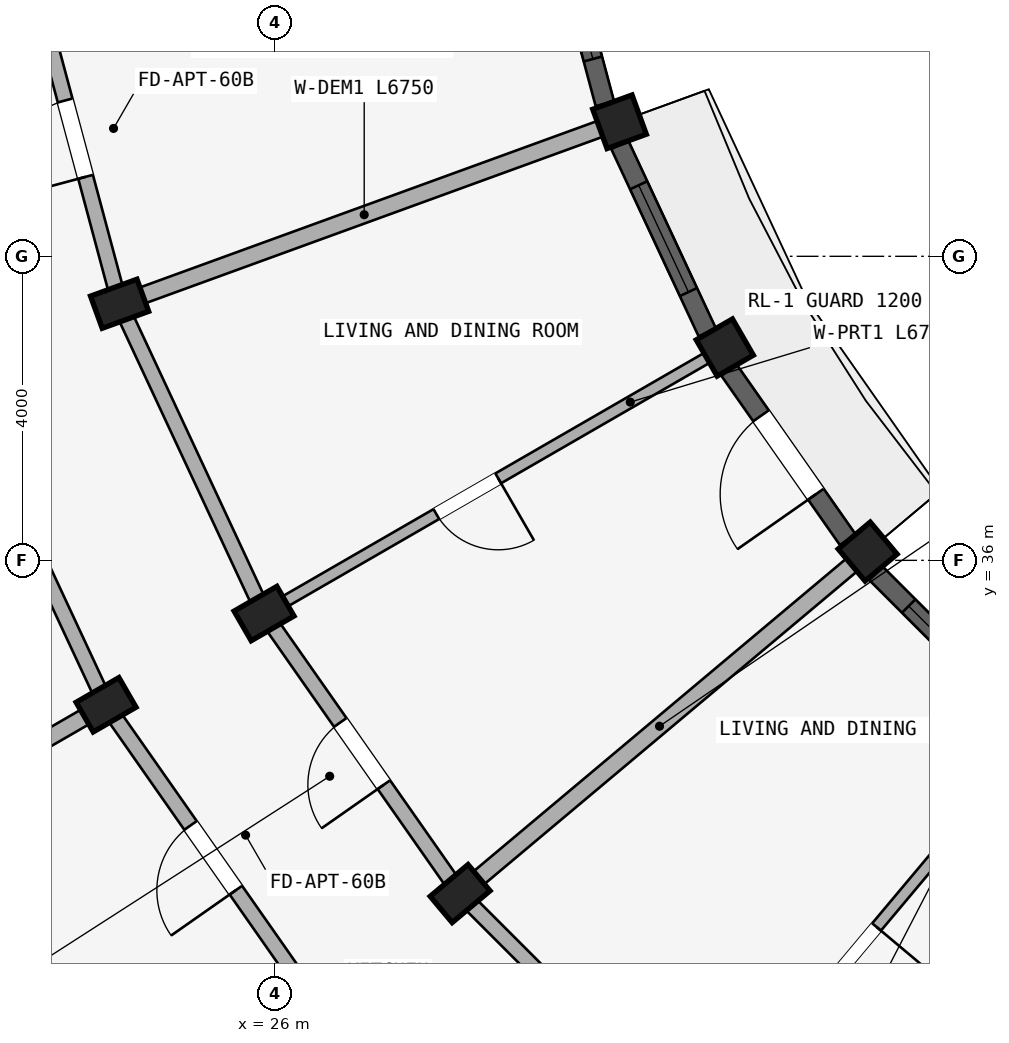
"""IFC4 building model, lengths in metres.
Left out: names, types, materials, properties, quantities, classifications, styles, units other than length and angle.
Written with IfcOpenShell. Run it as: python <this file> out.ifc"""

import sys

from ifc_helpers import new_model, si_unit, direction, frame, frame_2d, origin, origin_2d, place, context, subcontext, project, spatial, rectangle, extrude, element, fill, save


model = new_model("IFC4")
c1 = context("Model", 3, precision=1e-05, world=origin(), true_north=direction((0.0, 1.0)))
c2 = subcontext(c1, "Body", "Model", "MODEL_VIEW")
j1 = project(units=[si_unit("LENGTHUNIT", "METRE"), si_unit("PLANEANGLEUNIT", "RADIAN")], contexts=[c1])
p1 = place(None, origin())
s1 = spatial("IfcSite", under=j1, at=p1, CompositionType="ELEMENT")
p2 = place(p1, origin())
s2 = spatial("IfcBuilding", under=s1, at=p2, CompositionType="ELEMENT")
p3 = place(p2, frame((0.0, 0.0, 30.75)))
s3 = spatial("IfcBuildingStorey", under=s2, at=p3, CompositionType="ELEMENT", Elevation=30.75)
p4 = place(p3, frame((33.798, 36.115, 0.0), z_axis=(0.0, 0.0, 1.0), x_axis=(-0.642787609687, 0.766044443119, 0.0)))
e1 = element("IfcColumn", 1, at=p4, inside=s3, PredefinedType="COLUMN", context=c2, shape_type="SweptSolid", body=[
    extrude(rectangle(XDim=0.55, YDim=0.55, at=origin_2d()), origin(), (0.0, 0.0, 1.0), 2.91),
])
p5 = place(p3, frame((28.436, 31.616, 0.0), z_axis=(0.0, 0.0, 1.0), x_axis=(-0.642787609687, 0.766044443119, 0.0)))
e2 = element("IfcColumn", 2, at=p5, inside=s3, PredefinedType="COLUMN", context=c2, shape_type="SweptSolid", body=[
    extrude(rectangle(XDim=0.45, YDim=0.65, at=origin_2d()), origin(), (0.0, 0.0, 1.0), 2.91),
])
p6 = place(p3, frame((31.919, 38.8, 0.0), z_axis=(0.0, 0.0, 1.0), x_axis=(-0.5, 0.866025403784, 0.0)))
e3 = element("IfcColumn", 3, at=p6, inside=s3, PredefinedType="COLUMN", context=c2, shape_type="SweptSolid", body=[
    extrude(rectangle(XDim=0.55, YDim=0.55, at=origin_2d()), origin(), (0.0, 0.0, 1.0), 2.91),
])
for number, where, z_axis, x_axis in (
    (4, (25.856, 35.3, 0.0), (0.0, 0.0, 1.0), (-0.5, 0.866, 0.0)),
    (5, (23.778, 34.1, 0.0), (0.0, 0.0, 1.0), (-0.5, 0.866, 0.0)),
):
    element("IfcColumn", number, at=place(p3, frame(where, z_axis=z_axis, x_axis=x_axis)), inside=s3, PredefinedType="COLUMN", context=c2, shape_type="SweptSolid", body=[
        extrude(rectangle(XDim=0.45, YDim=0.65, at=origin_2d()), origin(), (0.0, 0.0, 1.0), 2.91),
    ])
p7 = place(p3, frame((30.534, 41.77, 0.0), z_axis=(0.0, 0.0, 1.0), x_axis=(-0.342020143326, 0.939692620786, 0.0)))
e6 = element("IfcColumn", 6, at=p7, inside=s3, PredefinedType="COLUMN", context=c2, shape_type="SweptSolid", body=[
    extrude(rectangle(XDim=0.55, YDim=0.55, at=origin_2d()), origin(), (0.0, 0.0, 1.0), 2.91),
])
p8 = place(p3, frame((23.956, 39.376, 0.0), z_axis=(0.0, 0.0, 1.0), x_axis=(-0.342020143326, 0.939692620786, 0.0)))
e7 = element("IfcColumn", 7, at=p8, inside=s3, PredefinedType="COLUMN", context=c2, shape_type="SweptSolid", body=[
    extrude(rectangle(XDim=0.45, YDim=0.65, at=origin_2d()), origin(), (0.0, 0.0, 1.0), 2.91),
])
p9 = place(p3, frame((31.616, 28.436, 0.0), z_axis=(0.0, 0.0, 1.0), x_axis=(-0.707106781187, 0.707106781187, 0.0)))
e8 = element("IfcWall", 8, at=p9, inside=s3, PredefinedType="STANDARD", context=c2, shape_type="SweptSolid", body=[
    extrude(rectangle(XDim=4.497, YDim=0.2, at=frame_2d((2.249, 0.0))), origin(), (0.0, 0.0, 1.0), 2.352),
])
p10 = place(p3, frame((28.436, 31.616, 0.0), z_axis=(0.0, 0.0, 1.0), x_axis=(-0.573571637217, 0.819155404658, 0.0)))
e9 = element("IfcWall", 9, at=p10, inside=s3, PredefinedType="STANDARD", context=c2, shape_type="SweptSolid", body=[
    extrude(rectangle(XDim=4.497, YDim=0.2, at=frame_2d((2.249, 0.0))), origin(), (0.0, 0.0, 1.0), 2.352),
])
p11 = place(p10, frame((1.749, 0.0, 0.0)))
e10 = element("IfcOpeningElement", 10, at=p11, cuts=e9, PredefinedType="OPENING", context=c2, shape_type="SweptSolid", body=[
    extrude(rectangle(XDim=1.0, YDim=2.15, at=frame_2d((0.5, 1.075))), frame((0.0, 0.11, 0.0), z_axis=(0.0, -1.0, 0.0), x_axis=(1.0, 0.0, 0.0)), (0.0, 0.0, 1.0), 0.22),
])
p12 = place(p3, frame((26.598, 30.073, 0.0), z_axis=(0.0, 0.0, 1.0), x_axis=(-0.573592335331, 0.819140911474, 0.0)))
e11 = element("IfcWall", 11, at=p12, inside=s3, PredefinedType="STANDARD", context=c2, shape_type="SweptSolid", body=[
    extrude(rectangle(XDim=4.916, YDim=0.2, at=frame_2d((2.458, 0.0))), origin(), (0.0, 0.0, 1.0), 2.352),
])
p13 = place(p12, frame((1.938, 0.0, 0.0)))
e12 = element("IfcOpeningElement", 12, at=p13, cuts=e11, PredefinedType="OPENING", context=c2, shape_type="SweptSolid", body=[
    extrude(rectangle(XDim=1.04, YDim=2.15, at=frame_2d((0.52, 1.075))), frame((0.0, 0.11, 0.0), z_axis=(0.0, -1.0, 0.0), x_axis=(1.0, 0.0, 0.0)), (0.0, 0.0, 1.0), 0.22),
])
p14 = place(p3, frame((25.856, 35.3, 0.0), z_axis=(0.0, 0.0, 1.0), x_axis=(-0.422617978463, 0.906307919131, 0.0)))
e13 = element("IfcWall", 13, at=p14, inside=s3, PredefinedType="STANDARD", context=c2, shape_type="SweptSolid", body=[
    extrude(rectangle(XDim=4.497, YDim=0.2, at=frame_2d((2.249, 0.0))), origin(), (0.0, 0.0, 1.0), 2.352),
])
p15 = place(p3, frame((23.778, 34.1, 0.0), z_axis=(0.0, 0.0, 1.0), x_axis=(-0.422629854778, 0.906302381024, 0.0)))
e14 = element("IfcWall", 14, at=p15, inside=s3, PredefinedType="STANDARD", context=c2, shape_type="SweptSolid", body=[
    extrude(rectangle(XDim=4.915, YDim=0.2, at=frame_2d((2.458, 0.0))), origin(), (0.0, 0.0, 1.0), 2.352),
])
p16 = place(p15, frame((1.918, 0.0, 0.0)))
e15 = element("IfcOpeningElement", 15, at=p16, cuts=e14, PredefinedType="OPENING", context=c2, shape_type="SweptSolid", body=[
    extrude(rectangle(XDim=1.08, YDim=2.15, at=frame_2d((0.54, 1.075))), frame((0.0, 0.11, 0.0), z_axis=(0.0, -1.0, 0.0), x_axis=(1.0, 0.0, 0.0)), (0.0, 0.0, 1.0), 0.22),
])
p17 = place(p3, frame((23.956, 39.376, 0.0), z_axis=(0.0, 0.0, 1.0), x_axis=(-0.258787642463, 0.965934240054, 0.0)))
e16 = element("IfcWall", 16, at=p17, inside=s3, PredefinedType="STANDARD", context=c2, shape_type="SweptSolid", body=[
    extrude(rectangle(XDim=4.497, YDim=0.2, at=frame_2d((2.249, 0.0))), origin(), (0.0, 0.0, 1.0), 2.352),
])
p18 = place(p17, frame((1.729, 0.0, 0.0)))
e17 = element("IfcOpeningElement", 17, at=p18, cuts=e16, PredefinedType="OPENING", context=c2, shape_type="SweptSolid", body=[
    extrude(rectangle(XDim=1.04, YDim=2.15, at=frame_2d((0.52, 1.075))), frame((0.0, 0.11, 0.0), z_axis=(0.0, -1.0, 0.0), x_axis=(1.0, 0.0, 0.0)), (0.0, 0.0, 1.0), 0.22),
])
p19 = place(p3, frame((35.987, 33.645, 0.0), z_axis=(0.0, 0.0, 1.0), x_axis=(-0.642784846501, -0.766046761698, 0.0)))
e18 = element("IfcWall", 18, at=p19, inside=s3, PredefinedType="PARTITIONING", context=c2, shape_type="SweptSolid", body=[
    extrude(rectangle(XDim=6.75, YDim=0.15, at=frame_2d((3.375, 0.0))), origin(), (0.0, 0.0, 1.0), 2.352),
])
p20 = place(p19, frame((3.222, 0.0, 0.0)))
e19 = element("IfcOpeningElement", 19, at=p20, cuts=e18, PredefinedType="OPENING", context=c2, shape_type="SweptSolid", body=[
    extrude(rectangle(XDim=0.98, YDim=2.12, at=frame_2d((0.49, 1.06))), frame((0.0, 0.085, 0.0), z_axis=(0.0, -1.0, 0.0), x_axis=(1.0, 0.0, 0.0)), (0.0, 0.0, 1.0), 0.17),
])
p21 = place(p3, frame((33.645, 35.987, 0.0), z_axis=(0.0, 0.0, 1.0), x_axis=(-0.766046761698, -0.642784846501, 0.0)))
e20 = element("IfcWall", 20, at=p21, inside=s3, PredefinedType="STANDARD", context=c2, shape_type="SweptSolid", body=[
    extrude(rectangle(XDim=6.75, YDim=0.22, at=frame_2d((3.375, 0.0))), origin(), (0.0, 0.0, 1.0), 2.352),
])
p22 = place(p3, frame((31.746, 38.7, 0.0), z_axis=(0.0, 0.0, 1.0), x_axis=(-0.866026575979, -0.499997969693, 0.0)))
e21 = element("IfcWall", 21, at=p22, inside=s3, PredefinedType="PARTITIONING", context=c2, shape_type="SweptSolid", body=[
    extrude(rectangle(XDim=6.75, YDim=0.15, at=frame_2d((3.375, 0.0))), origin(), (0.0, 0.0, 1.0), 2.352),
])
p23 = place(p22, frame((3.242, 0.0, 0.0)))
e22 = element("IfcOpeningElement", 22, at=p23, cuts=e21, PredefinedType="OPENING", context=c2, shape_type="SweptSolid", body=[
    extrude(rectangle(XDim=0.94, YDim=2.1, at=frame_2d((0.47, 1.05))), frame((0.0, 0.085, 0.0), z_axis=(0.0, -1.0, 0.0), x_axis=(1.0, 0.0, 0.0)), (0.0, 0.0, 1.0), 0.17),
])
p24 = place(p3, frame((23.691, 34.05, 0.0), z_axis=(0.0, 0.0, 1.0), x_axis=(-0.866019562905, -0.500010116563, 0.0)))
e23 = element("IfcWall", 23, at=p24, inside=s3, PredefinedType="STANDARD", context=c2, shape_type="SweptSolid", body=[
    extrude(rectangle(XDim=6.22, YDim=0.22, at=frame_2d((3.11, 0.0))), origin(), (0.0, 0.0, 1.0), 2.352),
])
p25 = place(p3, frame((30.346, 41.702, 0.0), z_axis=(0.0, 0.0, 1.0), x_axis=(-0.939696231917, -0.342010221662, 0.0)))
e24 = element("IfcWall", 24, at=p25, inside=s3, PredefinedType="STANDARD", context=c2, shape_type="SweptSolid", body=[
    extrude(rectangle(XDim=6.75, YDim=0.22, at=frame_2d((3.375, 0.0))), origin(), (0.0, 0.0, 1.0), 2.352),
])
p26 = place(p3, frame((35.83, 33.907, 0.0), z_axis=(0.0, 0.0, 1.0), x_axis=(-0.707106781187, 0.707106781187, 0.0)))
e25 = element("IfcWall", 25, at=p26, inside=s3, PredefinedType="STANDARD", context=c2, shape_type="SweptSolid", body=[
    extrude(rectangle(XDim=2.72, YDim=0.25, at=frame_2d((1.36, 0.0))), origin(), (0.0, 0.0, 1.0), 2.402),
])
p27 = place(p26, frame((0.61, 0.0, 0.552)))
e26 = element("IfcOpeningElement", 26, at=p27, cuts=e25, PredefinedType="OPENING", context=c2, shape_type="SweptSolid", body=[
    extrude(rectangle(XDim=1.5, YDim=1.65, at=frame_2d((0.75, 0.825))), frame((0.0, 0.135, 0.0), z_axis=(0.0, -1.0, 0.0), x_axis=(1.0, 0.0, 0.0)), (0.0, 0.0, 1.0), 0.27),
])
p28 = place(p3, frame((33.536, 36.272, 0.0), z_axis=(0.0, 0.0, 1.0), x_axis=(-0.573612950921, 0.819126475299, 0.0)))
e27 = element("IfcWall", 27, at=p28, inside=s3, PredefinedType="STANDARD", context=c2, shape_type="SweptSolid", body=[
    extrude(rectangle(XDim=2.72, YDim=0.25, at=frame_2d((1.36, 0.0))), origin(), (0.0, 0.0, 1.0), 2.402),
])
p29 = place(p28, frame((0.73, 0.0, 0.0)))
e28 = element("IfcOpeningElement", 28, at=p29, cuts=e27, PredefinedType="OPENING", context=c2, shape_type="SweptSolid", body=[
    extrude(rectangle(XDim=1.26, YDim=2.15, at=frame_2d((0.63, 1.075))), frame((0.0, 0.135, 0.0), z_axis=(0.0, -1.0, 0.0), x_axis=(1.0, 0.0, 0.0)), (0.0, 0.0, 1.0), 0.27),
])
p30 = place(p3, frame((31.688, 39.0, 0.0), z_axis=(0.0, 0.0, 1.0), x_axis=(-0.422629903269, 0.906302358412, 0.0)))
e29 = element("IfcWall", 29, at=p30, inside=s3, PredefinedType="STANDARD", context=c2, shape_type="SweptSolid", body=[
    extrude(rectangle(XDim=2.72, YDim=0.25, at=frame_2d((1.36, 0.0))), origin(), (0.0, 0.0, 1.0), 2.402),
])
p31 = place(p30, frame((0.585, 0.0, 0.602)))
e30 = element("IfcOpeningElement", 30, at=p31, cuts=e29, PredefinedType="OPENING", context=c2, shape_type="SweptSolid", body=[
    extrude(rectangle(XDim=1.55, YDim=1.6, at=frame_2d((0.775, 0.8))), frame((0.0, 0.135, 0.0), z_axis=(0.0, -1.0, 0.0), x_axis=(1.0, 0.0, 0.0)), (0.0, 0.0, 1.0), 0.27),
])
p32 = place(p3, frame((30.341, 42.007, 0.0), z_axis=(0.0, 0.0, 1.0), x_axis=(-0.258807879411, 0.965928818058, 0.0)))
e31 = element("IfcWall", 31, at=p32, inside=s3, PredefinedType="STANDARD", context=c2, shape_type="SweptSolid", body=[
    extrude(rectangle(XDim=2.72, YDim=0.25, at=frame_2d((1.36, 0.0))), origin(), (0.0, 0.0, 1.0), 2.402),
])
p33 = place(p32, frame((0.61, 0.0, 0.552)))
e32 = element("IfcOpeningElement", 32, at=p33, cuts=e31, PredefinedType="OPENING", context=c2, shape_type="SweptSolid", body=[
    extrude(rectangle(XDim=1.5, YDim=1.65, at=frame_2d((0.75, 0.825))), frame((0.0, 0.135, 0.0), z_axis=(0.0, -1.0, 0.0), x_axis=(1.0, 0.0, 0.0)), (0.0, 0.0, 1.0), 0.27),
])
p34 = place(p27, origin())
e33 = element("IfcWindow", 33, at=p34, inside=s3, PartitioningType="DOUBLE_PANEL_VERTICAL", PredefinedType="WINDOW", context=c2, shape_type="SweptSolid", body=[
    extrude(rectangle(XDim=1.5, YDim=1.65, at=frame_2d((0.75, 0.825))), frame((0.0, 0.03, 0.0), z_axis=(0.0, -1.0, 0.0), x_axis=(1.0, 0.0, 0.0)), (0.0, 0.0, 1.0), 0.06),
])
fill(e26, e33)
p35 = place(p31, origin())
e34 = element("IfcWindow", 34, at=p35, inside=s3, PartitioningType="DOUBLE_PANEL_VERTICAL", PredefinedType="WINDOW", context=c2, shape_type="SweptSolid", body=[
    extrude(rectangle(XDim=1.55, YDim=1.6, at=frame_2d((0.775, 0.8))), frame((0.0, 0.03, 0.0), z_axis=(0.0, -1.0, 0.0), x_axis=(1.0, 0.0, 0.0)), (0.0, 0.0, 1.0), 0.06),
])
fill(e30, e34)
p36 = place(p33, origin())
e35 = element("IfcWindow", 35, at=p36, inside=s3, PartitioningType="DOUBLE_PANEL_VERTICAL", PredefinedType="WINDOW", context=c2, shape_type="SweptSolid", body=[
    extrude(rectangle(XDim=1.5, YDim=1.65, at=frame_2d((0.75, 0.825))), frame((0.0, 0.03, 0.0), z_axis=(0.0, -1.0, 0.0), x_axis=(1.0, 0.0, 0.0)), (0.0, 0.0, 1.0), 0.06),
])
fill(e32, e35)
p37 = place(p20, frame((0.98, 0.0, 0.0), z_axis=(0.0, 0.0, 1.0), x_axis=(-1.0, 0.0, 0.0)))
e36 = element("IfcDoor", 36, at=p37, inside=s3, OperationType="SINGLE_SWING_RIGHT", PredefinedType="DOOR", context=c2, shape_type="SweptSolid", body=[
    extrude(rectangle(XDim=0.98, YDim=2.12, at=frame_2d((0.49, 1.06))), frame((0.0, 0.025, 0.0), z_axis=(0.0, -1.0, 0.0), x_axis=(1.0, 0.0, 0.0)), (0.0, 0.0, 1.0), 0.05),
])
fill(e19, e36)
p38 = place(p23, frame((0.94, 0.0, 0.0), z_axis=(0.0, 0.0, 1.0), x_axis=(-1.0, 0.0, 0.0)))
e37 = element("IfcDoor", 37, at=p38, inside=s3, OperationType="SINGLE_SWING_RIGHT", PredefinedType="DOOR", context=c2, shape_type="SweptSolid", body=[
    extrude(rectangle(XDim=0.94, YDim=2.1, at=frame_2d((0.47, 1.05))), frame((0.0, 0.025, 0.0), z_axis=(0.0, -1.0, 0.0), x_axis=(1.0, 0.0, 0.0)), (0.0, 0.0, 1.0), 0.05),
])
fill(e22, e37)
p39 = place(p13, origin())
e38 = element("IfcDoor", 38, at=p39, inside=s3, OperationType="SINGLE_SWING_LEFT", PredefinedType="DOOR", context=c2, shape_type="SweptSolid", body=[
    extrude(rectangle(XDim=1.04, YDim=2.15, at=frame_2d((0.52, 1.075))), frame((0.0, 0.025, 0.0), z_axis=(0.0, -1.0, 0.0), x_axis=(1.0, 0.0, 0.0)), (0.0, 0.0, 1.0), 0.05),
])
fill(e12, e38)
p40 = place(p11, frame((1.0, 0.0, 0.0), z_axis=(0.0, 0.0, 1.0), x_axis=(-1.0, 0.0, 0.0)))
e39 = element("IfcDoor", 39, at=p40, inside=s3, OperationType="SINGLE_SWING_RIGHT", PredefinedType="DOOR", context=c2, shape_type="SweptSolid", body=[
    extrude(rectangle(XDim=1.0, YDim=2.15, at=frame_2d((0.5, 1.075))), frame((0.0, 0.025, 0.0), z_axis=(0.0, -1.0, 0.0), x_axis=(1.0, 0.0, 0.0)), (0.0, 0.0, 1.0), 0.05),
])
fill(e10, e39)
p41 = place(p18, origin())
e40 = element("IfcDoor", 40, at=p41, inside=s3, OperationType="SINGLE_SWING_LEFT", PredefinedType="DOOR", context=c2, shape_type="SweptSolid", body=[
    extrude(rectangle(XDim=1.04, YDim=2.15, at=frame_2d((0.52, 1.075))), frame((0.0, 0.025, 0.0), z_axis=(0.0, -1.0, 0.0), x_axis=(1.0, 0.0, 0.0)), (0.0, 0.0, 1.0), 0.05),
])
fill(e17, e40)
p42 = place(p29, frame((1.26, 0.0, 0.0), z_axis=(0.0, 0.0, 1.0), x_axis=(-1.0, 0.0, 0.0)))
e41 = element("IfcDoor", 41, at=p42, inside=s3, OperationType="SINGLE_SWING_RIGHT", PredefinedType="DOOR", context=c2, shape_type="SweptSolid", body=[
    extrude(rectangle(XDim=1.26, YDim=2.15, at=frame_2d((0.63, 1.075))), frame((0.0, 0.025, 0.0), z_axis=(0.0, -1.0, 0.0), x_axis=(1.0, 0.0, 0.0)), (0.0, 0.0, 1.0), 0.05),
])
fill(e28, e41)
save(model, sys.argv[1])
